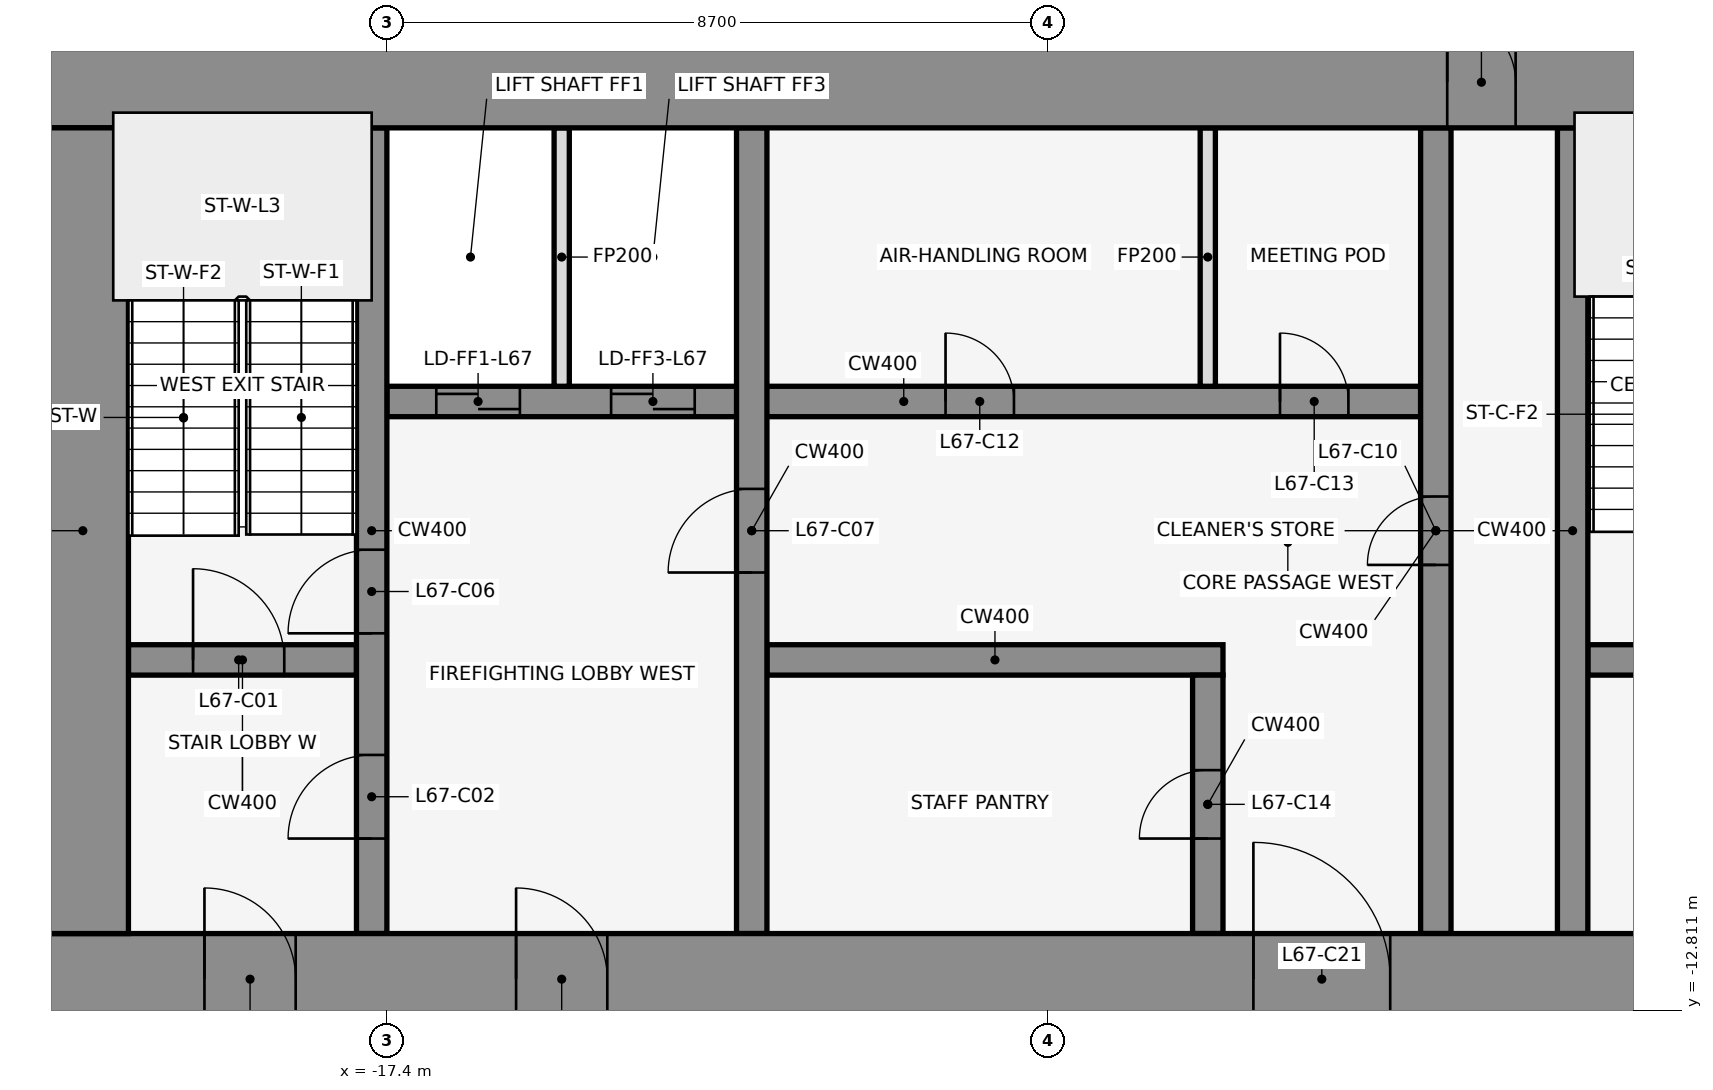
"""IFC4 building model, lengths in metres.
Left out: names, types, materials, properties, quantities, classifications, styles, units other than length and angle.
Written with IfcOpenShell. Run it as: python <this file> out.ifc"""

import sys

from ifc_helpers import new_model, si_unit, direction, frame, frame_2d, origin, place, context, subcontext, project, spatial, rectangle, extrude, element, fill, save


model = new_model("IFC4")
c1 = context("Model", 3, precision=1e-05, world=origin(), true_north=direction((0.0, 1.0)))
c2 = subcontext(c1, "Body", "Model", "MODEL_VIEW")
j1 = project(units=[si_unit("LENGTHUNIT", "METRE"), si_unit("PLANEANGLEUNIT", "RADIAN")], contexts=[c1])
p1 = place(None, origin())
s1 = spatial("IfcSite", under=j1, at=p1, CompositionType="ELEMENT")
p2 = place(p1, origin())
s2 = spatial("IfcBuilding", under=s1, at=p2, CompositionType="ELEMENT")
p3 = place(p2, frame((0.0, 0.0, 297.5)))
s3 = spatial("IfcBuildingStorey", under=s2, at=p3, CompositionType="ELEMENT", Elevation=297.5)
for number, where, z_axis, x_axis in (
    (1, (-0.068, -0.105, 0.0), (0.0, 0.0, 1.0), (-0.84, 0.543, 0.0)),
    (2, (-14.599, 1.08, 0.0), (0.0, 0.0, 1.0), (-0.84, -0.543, 0.0)),
):
    element("IfcWall", number, at=place(p3, frame(where, z_axis=z_axis, x_axis=x_axis)), inside=s3, PredefinedType="STANDARD", context=c2, shape_type="SweptSolid", body=[
        extrude(rectangle(XDim=2.183, YDim=0.25, at=frame_2d((1.091, 0.0))), origin(), (0.0, 0.0, 1.0), 4.35),
    ])
p4 = place(p3, frame((-20.8, -8.2, 0.0), z_axis=(0.0, 0.0, 1.0), x_axis=(1.0, 0.0, 0.0)))
e3 = element("IfcWall", 3, at=p4, inside=s3, PredefinedType="SHEAR", context=c2, shape_type="SweptSolid", body=[
    extrude(rectangle(XDim=3.0, YDim=0.4, at=frame_2d((1.5, 0.0))), origin(), (0.0, 0.0, 1.0), 4.5),
])
p5 = place(p4, frame((0.85, 0.0, 0.0)))
e4 = element("IfcOpeningElement", 4, at=p5, cuts=e3, PredefinedType="OPENING", context=c2, shape_type="SweptSolid", body=[
    extrude(rectangle(XDim=1.2, YDim=2.1, at=frame_2d((0.6, 1.05))), frame((0.0, 0.212, 0.0), z_axis=(0.0, -1.0, 0.0), x_axis=(1.0, 0.0, 0.0)), (0.0, 0.0, 1.0), 0.424),
])
p6 = place(p3, frame((-12.4, -8.2, 0.0), z_axis=(0.0, 0.0, 1.0), x_axis=(1.0, 0.0, 0.0)))
e5 = element("IfcWall", 5, at=p6, inside=s3, PredefinedType="SHEAR", context=c2, shape_type="SweptSolid", body=[
    extrude(rectangle(XDim=6.0, YDim=0.4, at=frame_2d((3.0, 0.0))), origin(), (0.0, 0.0, 1.0), 4.5),
])
p7 = place(p3, frame((-1.6, -8.2, 0.0), z_axis=(0.0, 0.0, 1.0), x_axis=(1.0, 0.0, 0.0)))
e6 = element("IfcWall", 6, at=p7, inside=s3, PredefinedType="SHEAR", context=c2, shape_type="SweptSolid", body=[
    extrude(rectangle(XDim=3.2, YDim=0.4, at=frame_2d((1.6, 0.0))), origin(), (0.0, 0.0, 1.0), 4.5),
])
p8 = place(p7, frame((1.05, 0.0, 0.0)))
e7 = element("IfcOpeningElement", 7, at=p8, cuts=e6, PredefinedType="OPENING", context=c2, shape_type="SweptSolid", body=[
    extrude(rectangle(XDim=1.2, YDim=2.1, at=frame_2d((0.6, 1.05))), frame((0.0, 0.212, 0.0), z_axis=(0.0, -1.0, 0.0), x_axis=(1.0, 0.0, 0.0)), (0.0, 0.0, 1.0), 0.424),
])
p9 = place(p3, frame((-17.4, -4.8, 0.0), z_axis=(0.0, 0.0, 1.0), x_axis=(1.0, 0.0, 0.0)))
e8 = element("IfcWall", 8, at=p9, inside=s3, PredefinedType="SHEAR", context=c2, shape_type="SweptSolid", body=[
    extrude(rectangle(XDim=13.6, YDim=0.4, at=frame_2d((6.8, 0.0))), origin(), (0.0, 0.0, 1.0), 4.5),
])
p10 = place(p9, frame((0.65, 0.0, 0.0)))
e9 = element("IfcOpeningElement", 9, at=p10, cuts=e8, PredefinedType="OPENING", context=c2, shape_type="SweptSolid", body=[
    extrude(rectangle(XDim=1.1, YDim=2.1, at=frame_2d((0.55, 1.05))), frame((0.0, 0.212, 0.0), z_axis=(0.0, -1.0, 0.0), x_axis=(1.0, 0.0, 0.0)), (0.0, 0.0, 1.0), 0.424),
])
p11 = place(p9, frame((2.95, 0.0, 0.0)))
e10 = element("IfcOpeningElement", 10, at=p11, cuts=e8, PredefinedType="OPENING", context=c2, shape_type="SweptSolid", body=[
    extrude(rectangle(XDim=1.1, YDim=2.1, at=frame_2d((0.55, 1.05))), frame((0.0, 0.212, 0.0), z_axis=(0.0, -1.0, 0.0), x_axis=(1.0, 0.0, 0.0)), (0.0, 0.0, 1.0), 0.424),
])
p12 = place(p9, frame((7.35, 0.0, 0.0)))
e11 = element("IfcOpeningElement", 11, at=p12, cuts=e8, PredefinedType="OPENING", context=c2, shape_type="SweptSolid", body=[
    extrude(rectangle(XDim=0.9, YDim=2.1, at=frame_2d((0.45, 1.05))), frame((0.0, 0.212, 0.0), z_axis=(0.0, -1.0, 0.0), x_axis=(1.0, 0.0, 0.0)), (0.0, 0.0, 1.0), 0.424),
])
p13 = place(p9, frame((11.75, 0.0, 0.0)))
e12 = element("IfcOpeningElement", 12, at=p13, cuts=e8, PredefinedType="OPENING", context=c2, shape_type="SweptSolid", body=[
    extrude(rectangle(XDim=0.9, YDim=2.1, at=frame_2d((0.45, 1.05))), frame((0.0, 0.212, 0.0), z_axis=(0.0, -1.0, 0.0), x_axis=(1.0, 0.0, 0.0)), (0.0, 0.0, 1.0), 0.424),
])
p14 = place(p3, frame((-17.6, -11.8, 0.0), z_axis=(0.0, 0.0, 1.0), x_axis=(0.0, 1.0, 0.0)))
e13 = element("IfcWall", 13, at=p14, inside=s3, PredefinedType="SHEAR", context=c2, shape_type="SweptSolid", body=[
    extrude(rectangle(XDim=10.6, YDim=0.4, at=frame_2d((5.3, 0.0))), origin(), (0.0, 0.0, 1.0), 4.5),
])
p15 = place(p14, frame((1.25, 0.0, 0.0)))
e14 = element("IfcOpeningElement", 14, at=p15, cuts=e13, PredefinedType="OPENING", context=c2, shape_type="SweptSolid", body=[
    extrude(rectangle(XDim=1.1, YDim=2.1, at=frame_2d((0.55, 1.05))), frame((0.0, 0.212, 0.0), z_axis=(0.0, -1.0, 0.0), x_axis=(1.0, 0.0, 0.0)), (0.0, 0.0, 1.0), 0.424),
])
p16 = place(p14, frame((3.95, 0.0, 0.0)))
e15 = element("IfcOpeningElement", 15, at=p16, cuts=e13, PredefinedType="OPENING", context=c2, shape_type="SweptSolid", body=[
    extrude(rectangle(XDim=1.1, YDim=2.1, at=frame_2d((0.55, 1.05))), frame((0.0, 0.212, 0.0), z_axis=(0.0, -1.0, 0.0), x_axis=(1.0, 0.0, 0.0)), (0.0, 0.0, 1.0), 0.424),
])
p17 = place(p3, frame((-15.1, -4.6, 0.0), z_axis=(0.0, 0.0, 1.0), x_axis=(0.0, 1.0, 0.0)))
e16 = element("IfcWall", 16, at=p17, inside=s3, PredefinedType="PARTITIONING", context=c2, shape_type="SweptSolid", body=[
    extrude(rectangle(XDim=3.4, YDim=0.2, at=frame_2d((1.7, 0.0))), origin(), (0.0, 0.0, 1.0), 3.418),
])
p18 = place(p3, frame((-12.6, -11.8, 0.0), z_axis=(0.0, 0.0, 1.0), x_axis=(0.0, 1.0, 0.0)))
e17 = element("IfcWall", 17, at=p18, inside=s3, PredefinedType="SHEAR", context=c2, shape_type="SweptSolid", body=[
    extrude(rectangle(XDim=10.6, YDim=0.4, at=frame_2d((5.3, 0.0))), origin(), (0.0, 0.0, 1.0), 4.5),
])
p19 = place(p18, frame((4.75, 0.0, 0.0)))
e18 = element("IfcOpeningElement", 18, at=p19, cuts=e17, PredefinedType="OPENING", context=c2, shape_type="SweptSolid", body=[
    extrude(rectangle(XDim=1.1, YDim=2.1, at=frame_2d((0.55, 1.05))), frame((0.0, 0.212, 0.0), z_axis=(0.0, -1.0, 0.0), x_axis=(1.0, 0.0, 0.0)), (0.0, 0.0, 1.0), 0.424),
])
p20 = place(p3, frame((-6.6, -11.8, 0.0), z_axis=(0.0, 0.0, 1.0), x_axis=(0.0, 1.0, 0.0)))
e19 = element("IfcWall", 19, at=p20, inside=s3, PredefinedType="SHEAR", context=c2, shape_type="SweptSolid", body=[
    extrude(rectangle(XDim=3.4, YDim=0.4, at=frame_2d((1.7, 0.0))), origin(), (0.0, 0.0, 1.0), 4.5),
])
p21 = place(p20, frame((1.25, 0.0, 0.0)))
e20 = element("IfcOpeningElement", 20, at=p21, cuts=e19, PredefinedType="OPENING", context=c2, shape_type="SweptSolid", body=[
    extrude(rectangle(XDim=0.9, YDim=2.1, at=frame_2d((0.45, 1.05))), frame((0.0, 0.212, 0.0), z_axis=(0.0, -1.0, 0.0), x_axis=(1.0, 0.0, 0.0)), (0.0, 0.0, 1.0), 0.424),
])
p22 = place(p3, frame((-6.6, -4.6, 0.0), z_axis=(0.0, 0.0, 1.0), x_axis=(0.0, 1.0, 0.0)))
e21 = element("IfcWall", 21, at=p22, inside=s3, PredefinedType="PARTITIONING", context=c2, shape_type="SweptSolid", body=[
    extrude(rectangle(XDim=3.4, YDim=0.2, at=frame_2d((1.7, 0.0))), origin(), (0.0, 0.0, 1.0), 3.418),
])
p23 = place(p3, frame((-3.6, -11.8, 0.0), z_axis=(0.0, 0.0, 1.0), x_axis=(0.0, 1.0, 0.0)))
e22 = element("IfcWall", 22, at=p23, inside=s3, PredefinedType="SHEAR", context=c2, shape_type="SweptSolid", body=[
    extrude(rectangle(XDim=10.6, YDim=0.4, at=frame_2d((5.3, 0.0))), origin(), (0.0, 0.0, 1.0), 4.5),
])
p24 = place(p23, frame((4.85, 0.0, 0.0)))
e23 = element("IfcOpeningElement", 23, at=p24, cuts=e22, PredefinedType="OPENING", context=c2, shape_type="SweptSolid", body=[
    extrude(rectangle(XDim=0.9, YDim=2.1, at=frame_2d((0.45, 1.05))), frame((0.0, 0.212, 0.0), z_axis=(0.0, -1.0, 0.0), x_axis=(1.0, 0.0, 0.0)), (0.0, 0.0, 1.0), 0.424),
])
p25 = place(p3, frame((-1.8, -11.8, 0.0), z_axis=(0.0, 0.0, 1.0), x_axis=(0.0, 1.0, 0.0)))
e24 = element("IfcWall", 24, at=p25, inside=s3, PredefinedType="SHEAR", context=c2, shape_type="SweptSolid", body=[
    extrude(rectangle(XDim=10.6, YDim=0.4, at=frame_2d((5.3, 0.0))), origin(), (0.0, 0.0, 1.0), 4.5),
])
p26 = place(p3, frame((-22.0, -0.6, 0.0), z_axis=(0.0, 0.0, 1.0), x_axis=(1.0, 0.0, 0.0)))
e25 = element("IfcWall", 25, at=p26, inside=s3, PredefinedType="SHEAR", context=c2, shape_type="SweptSolid", body=[
    extrude(rectangle(XDim=44.0, YDim=1.2, at=frame_2d((22.0, 0.0))), origin(), (0.0, 0.0, 1.0), 4.5),
])
p27 = place(p26, frame((18.55, 0.0, 0.0)))
e26 = element("IfcOpeningElement", 26, at=p27, cuts=e25, PredefinedType="OPENING", context=c2, shape_type="SweptSolid", body=[
    extrude(rectangle(XDim=0.9, YDim=2.1, at=frame_2d((0.45, 1.05))), frame((0.0, 0.612, 0.0), z_axis=(0.0, -1.0, 0.0), x_axis=(1.0, 0.0, 0.0)), (0.0, 0.0, 1.0), 1.224),
])
p28 = place(p26, frame((24.55, 0.0, 0.0)))
e27 = element("IfcOpeningElement", 27, at=p28, cuts=e25, PredefinedType="OPENING", context=c2, shape_type="SweptSolid", body=[
    extrude(rectangle(XDim=0.9, YDim=2.1, at=frame_2d((0.45, 1.05))), frame((0.0, 0.612, 0.0), z_axis=(0.0, -1.0, 0.0), x_axis=(1.0, 0.0, 0.0)), (0.0, 0.0, 1.0), 1.224),
])
p29 = place(p3, frame((-22.0, -12.4, 0.0), z_axis=(0.0, 0.0, 1.0), x_axis=(1.0, 0.0, 0.0)))
e28 = element("IfcWall", 28, at=p29, inside=s3, PredefinedType="SHEAR", context=c2, shape_type="SweptSolid", body=[
    extrude(rectangle(XDim=44.0, YDim=1.2, at=frame_2d((22.0, 0.0))), origin(), (0.0, 0.0, 1.0), 4.5),
])
p30 = place(p29, frame((2.2, 0.0, 0.0)))
e29 = element("IfcOpeningElement", 29, at=p30, cuts=e28, PredefinedType="OPENING", context=c2, shape_type="SweptSolid", body=[
    extrude(rectangle(XDim=1.2, YDim=2.1, at=frame_2d((0.6, 1.05))), frame((0.0, 0.612, 0.0), z_axis=(0.0, -1.0, 0.0), x_axis=(1.0, 0.0, 0.0)), (0.0, 0.0, 1.0), 1.224),
])
p31 = place(p29, frame((21.4, 0.0, 0.0)))
e30 = element("IfcOpeningElement", 30, at=p31, cuts=e28, PredefinedType="OPENING", context=c2, shape_type="SweptSolid", body=[
    extrude(rectangle(XDim=1.2, YDim=2.1, at=frame_2d((0.6, 1.05))), frame((0.0, 0.612, 0.0), z_axis=(0.0, -1.0, 0.0), x_axis=(1.0, 0.0, 0.0)), (0.0, 0.0, 1.0), 1.224),
])
p32 = place(p29, frame((40.6, 0.0, 0.0)))
e31 = element("IfcOpeningElement", 31, at=p32, cuts=e28, PredefinedType="OPENING", context=c2, shape_type="SweptSolid", body=[
    extrude(rectangle(XDim=1.2, YDim=2.1, at=frame_2d((0.6, 1.05))), frame((0.0, 0.612, 0.0), z_axis=(0.0, -1.0, 0.0), x_axis=(1.0, 0.0, 0.0)), (0.0, 0.0, 1.0), 1.224),
])
p33 = place(p29, frame((16.0, 0.0, 0.0)))
e32 = element("IfcOpeningElement", 32, at=p33, cuts=e28, PredefinedType="OPENING", context=c2, shape_type="SweptSolid", body=[
    extrude(rectangle(XDim=1.8, YDim=2.1, at=frame_2d((0.9, 1.05))), frame((0.0, 0.612, 0.0), z_axis=(0.0, -1.0, 0.0), x_axis=(1.0, 0.0, 0.0)), (0.0, 0.0, 1.0), 1.224),
])
p34 = place(p29, frame((6.3, 0.0, 0.0)))
e33 = element("IfcOpeningElement", 33, at=p34, cuts=e28, PredefinedType="OPENING", context=c2, shape_type="SweptSolid", body=[
    extrude(rectangle(XDim=1.2, YDim=2.1, at=frame_2d((0.6, 1.05))), frame((0.0, 0.612, 0.0), z_axis=(0.0, -1.0, 0.0), x_axis=(1.0, 0.0, 0.0)), (0.0, 0.0, 1.0), 1.224),
])
p35 = place(p29, frame((26.2, 0.0, 0.0)))
e34 = element("IfcOpeningElement", 34, at=p35, cuts=e28, PredefinedType="OPENING", context=c2, shape_type="SweptSolid", body=[
    extrude(rectangle(XDim=1.8, YDim=2.1, at=frame_2d((0.9, 1.05))), frame((0.0, 0.612, 0.0), z_axis=(0.0, -1.0, 0.0), x_axis=(1.0, 0.0, 0.0)), (0.0, 0.0, 1.0), 1.224),
])
p36 = place(p29, frame((36.5, 0.0, 0.0)))
e35 = element("IfcOpeningElement", 35, at=p36, cuts=e28, PredefinedType="OPENING", context=c2, shape_type="SweptSolid", body=[
    extrude(rectangle(XDim=1.2, YDim=2.1, at=frame_2d((0.6, 1.05))), frame((0.0, 0.612, 0.0), z_axis=(0.0, -1.0, 0.0), x_axis=(1.0, 0.0, 0.0)), (0.0, 0.0, 1.0), 1.224),
])
p37 = place(p3, frame((-21.4, -11.8, 0.0), z_axis=(0.0, 0.0, 1.0), x_axis=(0.0, 1.0, 0.0)))
e36 = element("IfcWall", 36, at=p37, inside=s3, PredefinedType="SHEAR", context=c2, shape_type="SweptSolid", body=[
    extrude(rectangle(XDim=10.6, YDim=1.2, at=frame_2d((5.3, 0.0))), origin(), (0.0, 0.0, 1.0), 4.5),
])
p38 = place(p5, origin())
e37 = element("IfcDoor", 37, at=p38, inside=s3, OperationType="SINGLE_SWING_LEFT", PredefinedType="DOOR", context=c2, shape_type="SweptSolid", body=[
    extrude(rectangle(XDim=1.2, YDim=2.1, at=frame_2d((0.6, 1.05))), frame((0.0, 0.025, 0.0), z_axis=(0.0, -1.0, 0.0), x_axis=(1.0, 0.0, 0.0)), (0.0, 0.0, 1.0), 0.05),
])
fill(e4, e37)
p39 = place(p15, frame((1.1, 0.0, 0.0), z_axis=(0.0, 0.0, 1.0), x_axis=(-1.0, 0.0, 0.0)))
e38 = element("IfcDoor", 38, at=p39, inside=s3, OperationType="SINGLE_SWING_LEFT", PredefinedType="DOOR", context=c2, shape_type="SweptSolid", body=[
    extrude(rectangle(XDim=1.1, YDim=2.1, at=frame_2d((0.55, 1.05))), frame((0.0, 0.025, 0.0), z_axis=(0.0, -1.0, 0.0), x_axis=(1.0, 0.0, 0.0)), (0.0, 0.0, 1.0), 0.05),
])
fill(e14, e38)
p40 = place(p10, origin())
e39 = element("IfcDoor", 39, at=p40, inside=s3, OperationType="DOUBLE_DOOR_SLIDING", PredefinedType="DOOR", context=c2, shape_type="SweptSolid", body=[
    extrude(rectangle(XDim=1.1, YDim=2.1, at=frame_2d((0.55, 1.05))), frame((0.0, 0.025, 0.0), z_axis=(0.0, -1.0, 0.0), x_axis=(1.0, 0.0, 0.0)), (0.0, 0.0, 1.0), 0.05),
])
fill(e9, e39)
p41 = place(p11, origin())
e40 = element("IfcDoor", 40, at=p41, inside=s3, OperationType="DOUBLE_DOOR_SLIDING", PredefinedType="DOOR", context=c2, shape_type="SweptSolid", body=[
    extrude(rectangle(XDim=1.1, YDim=2.1, at=frame_2d((0.55, 1.05))), frame((0.0, 0.025, 0.0), z_axis=(0.0, -1.0, 0.0), x_axis=(1.0, 0.0, 0.0)), (0.0, 0.0, 1.0), 0.05),
])
fill(e10, e40)
p42 = place(p16, frame((1.1, 0.0, 0.0), z_axis=(0.0, 0.0, 1.0), x_axis=(-1.0, 0.0, 0.0)))
e41 = element("IfcDoor", 41, at=p42, inside=s3, OperationType="SINGLE_SWING_LEFT", PredefinedType="DOOR", context=c2, shape_type="SweptSolid", body=[
    extrude(rectangle(XDim=1.1, YDim=2.1, at=frame_2d((0.55, 1.05))), frame((0.0, 0.025, 0.0), z_axis=(0.0, -1.0, 0.0), x_axis=(1.0, 0.0, 0.0)), (0.0, 0.0, 1.0), 0.05),
])
fill(e15, e41)
p43 = place(p19, origin())
e42 = element("IfcDoor", 42, at=p43, inside=s3, OperationType="SINGLE_SWING_LEFT", PredefinedType="DOOR", context=c2, shape_type="SweptSolid", body=[
    extrude(rectangle(XDim=1.1, YDim=2.1, at=frame_2d((0.55, 1.05))), frame((0.0, 0.025, 0.0), z_axis=(0.0, -1.0, 0.0), x_axis=(1.0, 0.0, 0.0)), (0.0, 0.0, 1.0), 0.05),
])
fill(e18, e42)
p44 = place(p24, frame((0.9, 0.0, 0.0), z_axis=(0.0, 0.0, 1.0), x_axis=(-1.0, 0.0, 0.0)))
e43 = element("IfcDoor", 43, at=p44, inside=s3, OperationType="SINGLE_SWING_LEFT", PredefinedType="DOOR", context=c2, shape_type="SweptSolid", body=[
    extrude(rectangle(XDim=0.9, YDim=2.1, at=frame_2d((0.45, 1.05))), frame((0.0, 0.025, 0.0), z_axis=(0.0, -1.0, 0.0), x_axis=(1.0, 0.0, 0.0)), (0.0, 0.0, 1.0), 0.05),
])
fill(e23, e43)
p45 = place(p12, origin())
e44 = element("IfcDoor", 44, at=p45, inside=s3, OperationType="SINGLE_SWING_RIGHT", PredefinedType="DOOR", context=c2, shape_type="SweptSolid", body=[
    extrude(rectangle(XDim=0.9, YDim=2.1, at=frame_2d((0.45, 1.05))), frame((0.0, 0.025, 0.0), z_axis=(0.0, -1.0, 0.0), x_axis=(1.0, 0.0, 0.0)), (0.0, 0.0, 1.0), 0.05),
])
fill(e11, e44)
p46 = place(p13, origin())
e45 = element("IfcDoor", 45, at=p46, inside=s3, OperationType="SINGLE_SWING_LEFT", PredefinedType="DOOR", context=c2, shape_type="SweptSolid", body=[
    extrude(rectangle(XDim=0.9, YDim=2.1, at=frame_2d((0.45, 1.05))), frame((0.0, 0.025, 0.0), z_axis=(0.0, -1.0, 0.0), x_axis=(1.0, 0.0, 0.0)), (0.0, 0.0, 1.0), 0.05),
])
fill(e12, e45)
p47 = place(p21, origin())
e46 = element("IfcDoor", 46, at=p47, inside=s3, OperationType="SINGLE_SWING_RIGHT", PredefinedType="DOOR", context=c2, shape_type="SweptSolid", body=[
    extrude(rectangle(XDim=0.9, YDim=2.1, at=frame_2d((0.45, 1.05))), frame((0.0, 0.025, 0.0), z_axis=(0.0, -1.0, 0.0), x_axis=(1.0, 0.0, 0.0)), (0.0, 0.0, 1.0), 0.05),
])
fill(e20, e46)
p48 = place(p27, origin())
e47 = element("IfcDoor", 47, at=p48, inside=s3, OperationType="SINGLE_SWING_LEFT", PredefinedType="DOOR", context=c2, shape_type="SweptSolid", body=[
    extrude(rectangle(XDim=0.9, YDim=2.1, at=frame_2d((0.45, 1.05))), frame((0.0, 0.025, 0.0), z_axis=(0.0, -1.0, 0.0), x_axis=(1.0, 0.0, 0.0)), (0.0, 0.0, 1.0), 0.05),
])
fill(e26, e47)
p49 = place(p30, frame((1.2, 0.0, 0.0), z_axis=(0.0, 0.0, 1.0), x_axis=(-1.0, 0.0, 0.0)))
e48 = element("IfcDoor", 48, at=p49, inside=s3, OperationType="SINGLE_SWING_RIGHT", PredefinedType="DOOR", context=c2, shape_type="SweptSolid", body=[
    extrude(rectangle(XDim=1.2, YDim=2.1, at=frame_2d((0.6, 1.05))), frame((0.0, 0.025, 0.0), z_axis=(0.0, -1.0, 0.0), x_axis=(1.0, 0.0, 0.0)), (0.0, 0.0, 1.0), 0.05),
])
fill(e29, e48)
p50 = place(p33, origin())
e49 = element("IfcDoor", 49, at=p50, inside=s3, OperationType="SINGLE_SWING_LEFT", PredefinedType="DOOR", context=c2, shape_type="SweptSolid", body=[
    extrude(rectangle(XDim=1.8, YDim=2.1, at=frame_2d((0.9, 1.05))), frame((0.0, 0.025, 0.0), z_axis=(0.0, -1.0, 0.0), x_axis=(1.0, 0.0, 0.0)), (0.0, 0.0, 1.0), 0.05),
])
fill(e32, e49)
p51 = place(p34, frame((1.2, 0.0, 0.0), z_axis=(0.0, 0.0, 1.0), x_axis=(-1.0, 0.0, 0.0)))
e50 = element("IfcDoor", 50, at=p51, inside=s3, OperationType="SINGLE_SWING_RIGHT", PredefinedType="DOOR", context=c2, shape_type="SweptSolid", body=[
    extrude(rectangle(XDim=1.2, YDim=2.1, at=frame_2d((0.6, 1.05))), frame((0.0, 0.025, 0.0), z_axis=(0.0, -1.0, 0.0), x_axis=(1.0, 0.0, 0.0)), (0.0, 0.0, 1.0), 0.05),
])
fill(e33, e50)
save(model, sys.argv[1])
